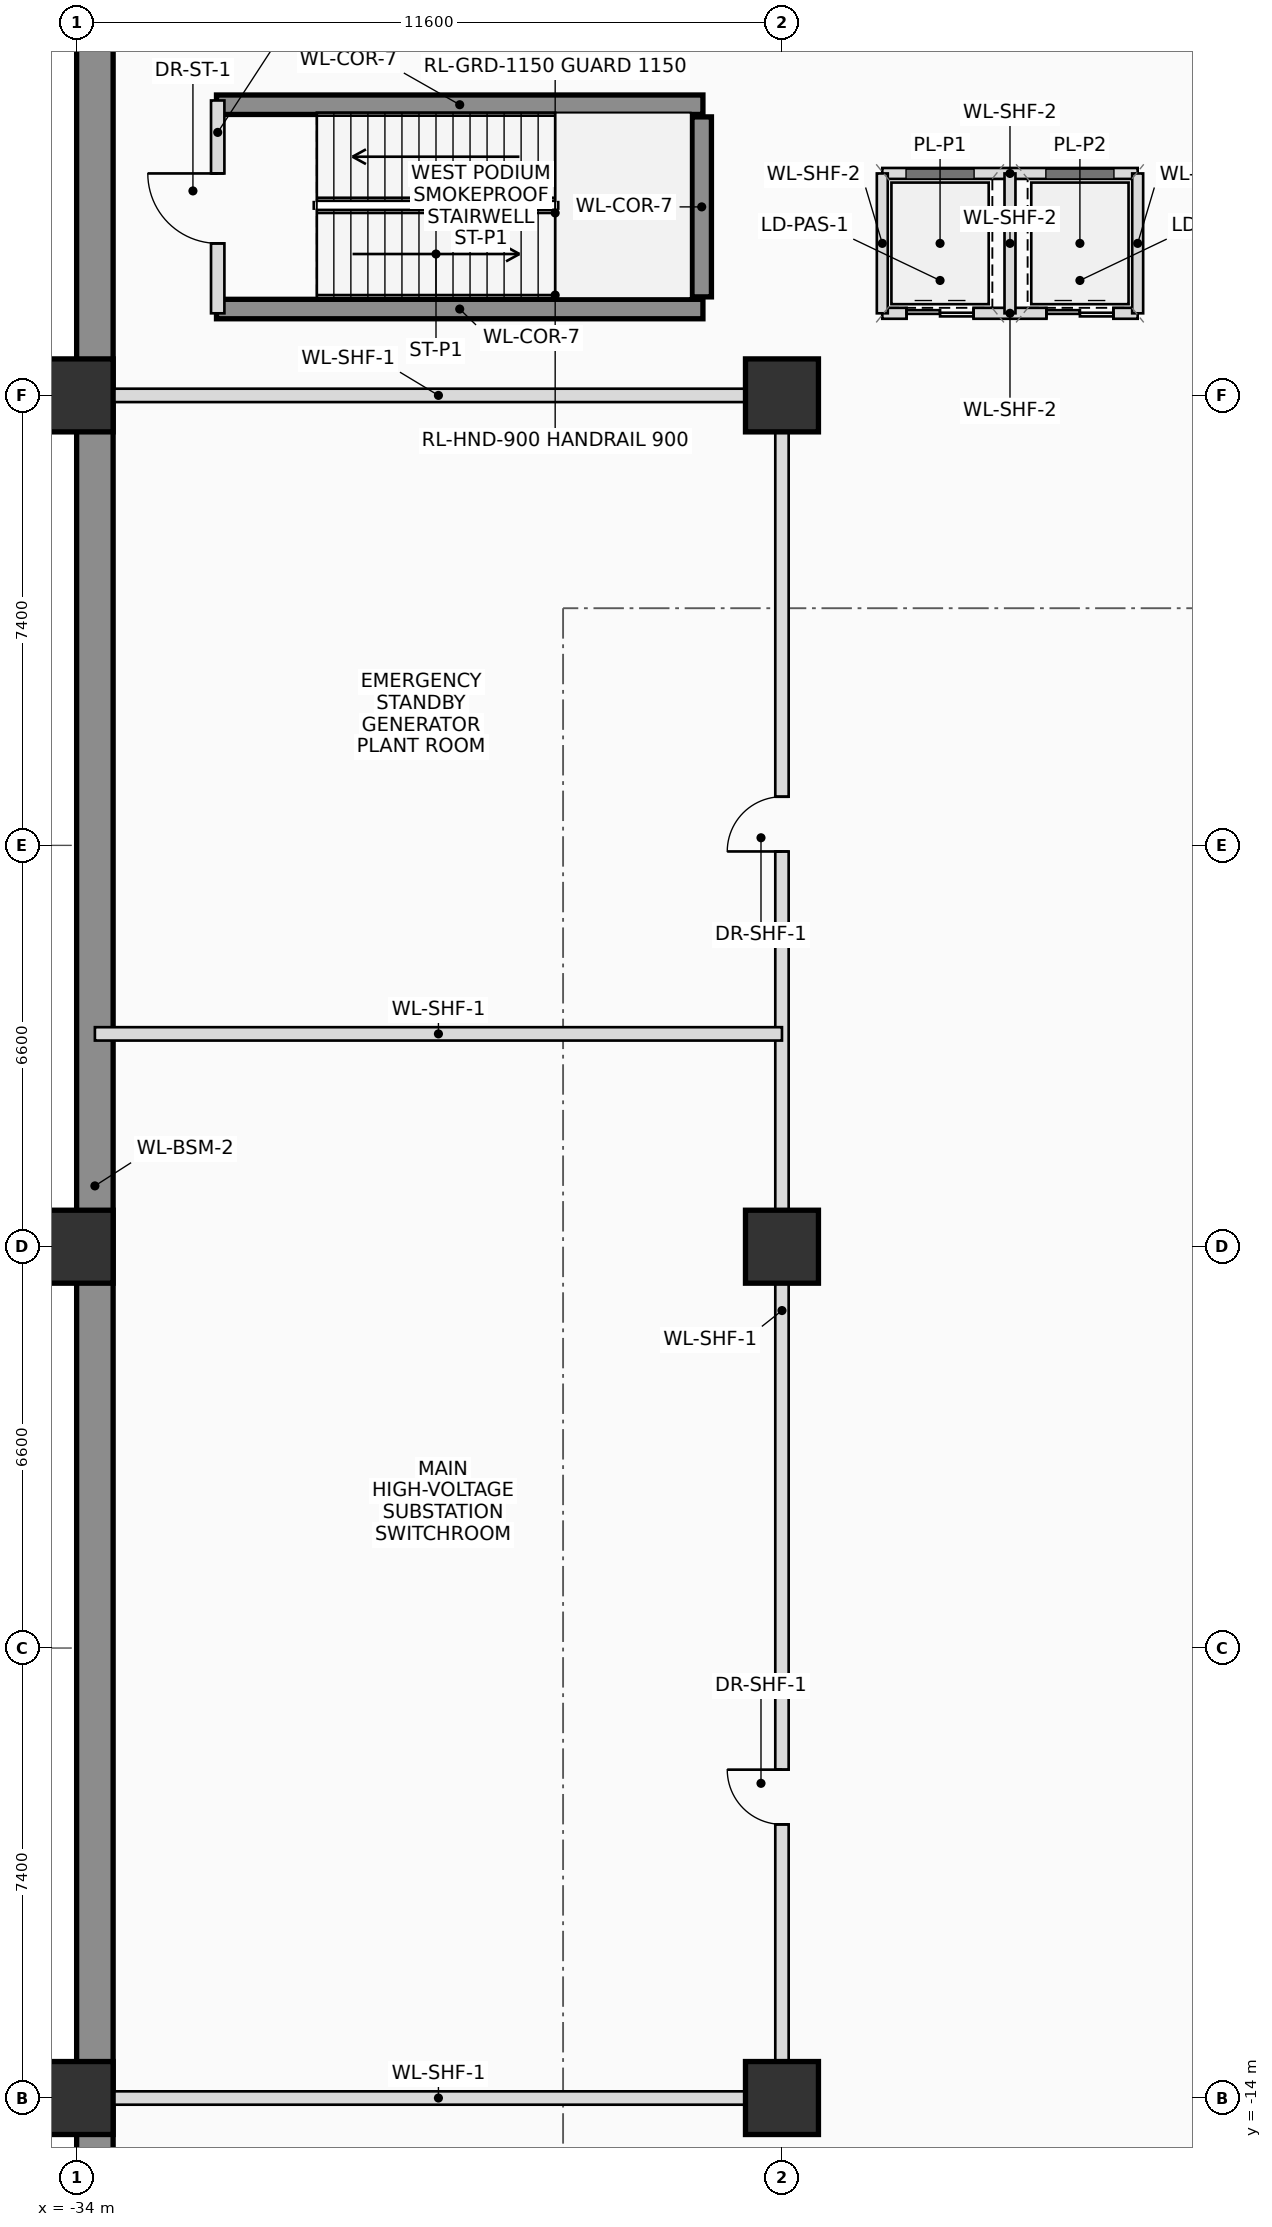
"""IFC4 building model, lengths in metres.
Left out: names, types, materials, properties, quantities, classifications, styles, units other than length and angle.
Written with IfcOpenShell. Run it as: python <this file> out.ifc"""

import sys

from ifc_helpers import new_model, si_unit, direction, frame, frame_2d, origin, origin_2d, place, context, subcontext, project, spatial, rectangle, extrude, source, transform, mapped, element, fill, save


model = new_model("IFC4")
c1 = context("Model", 3, precision=1e-05, world=origin(), true_north=direction((0.0, 1.0)))
c2 = subcontext(c1, "Body", "Model", "MODEL_VIEW")
j1 = project(units=[si_unit("LENGTHUNIT", "METRE"), si_unit("PLANEANGLEUNIT", "RADIAN")], contexts=[c1])
p1 = place(None, origin())
s1 = spatial("IfcSite", under=j1, at=p1, CompositionType="ELEMENT")
p2 = place(p1, origin())
s2 = spatial("IfcBuilding", under=s1, at=p2, CompositionType="ELEMENT")
p3 = place(p2, frame((0.0, 0.0, -4.8)))
s3 = spatial("IfcBuildingStorey", under=s2, at=p3, CompositionType="ELEMENT", Elevation=-4.8)
for number, where, z_axis, x_axis in (
    (1, (-31.7, 18.78, 0.0), (0.0, 0.0, 1.0), (1.0, 0.0, 0.0)),
    (2, (-31.7, 15.42, 0.0), (0.0, 0.0, 1.0), (1.0, 0.0, 0.0)),
):
    element("IfcWall", number, at=place(p3, frame(where, z_axis=z_axis, x_axis=x_axis)), inside=s3, PredefinedType="SHEAR", context=c2, shape_type="SweptSolid", body=[
        extrude(rectangle(XDim=8.0, YDim=0.32, at=frame_2d((4.0, 0.0))), origin(), (0.0, 0.0, 1.0), 4.8),
    ])
p4 = place(p3, frame((-23.72, 15.62, 0.0), z_axis=(0.0, 0.0, 1.0), x_axis=(0.0, 1.0, 0.0)))
e3 = element("IfcWall", 3, at=p4, inside=s3, PredefinedType="SHEAR", context=c2, shape_type="SweptSolid", body=[
    extrude(rectangle(XDim=2.96, YDim=0.32, at=frame_2d((1.48, 0.0))), origin(), (0.0, 0.0, 1.0), 4.8),
])
p5 = place(p3, frame((-33.7, -26.9, 0.0), z_axis=(0.0, 0.0, 1.0), x_axis=(0.0, 1.0, 0.0)))
e4 = element("IfcWall", 4, at=p5, inside=s3, PredefinedType="USERDEFINED", context=c2, shape_type="SweptSolid", body=[
    extrude(rectangle(XDim=55.8, YDim=0.6, at=frame_2d((27.9, 0.0))), origin(), (0.0, 0.0, 1.0), 4.56),
])
m1 = source(origin(), c2, "Body", "SweptSolid", [
    extrude(rectangle(XDim=1.2, YDim=1.2, at=origin_2d()), origin(), (0.0, 0.0, 1.0), 4.8),
])
for number, where, z_axis, x_axis in (
    (5, (-34.0, -14.0, 0.0), (0.0, 0.0, 1.0), (1.0, 0.0, 0.0)),
    (6, (-22.4, -14.0, 0.0), (0.0, 0.0, 1.0), (1.0, 0.0, 0.0)),
    (7, (-34.0, 0.0, 0.0), (0.0, 0.0, 1.0), (1.0, 0.0, 0.0)),
    (8, (-22.4, 0.0, 0.0), (0.0, 0.0, 1.0), (1.0, 0.0, 0.0)),
    (9, (-34.0, 14.0, 0.0), (0.0, 0.0, 1.0), (1.0, 0.0, 0.0)),
    (10, (-22.4, 14.0, 0.0), (0.0, 0.0, 1.0), (1.0, 0.0, 0.0)),
):
    element("IfcColumn", number, at=place(p3, frame(where, z_axis=z_axis, x_axis=x_axis)), inside=s3, PredefinedType="COLUMN", context=c2, shape_type="MappedRepresentation", body=[
        mapped(m1, transform((0.0, 0.0, 0.0), scale=1.0)),
    ])
p6 = place(p3, frame((-31.68, 15.35, 0.0), z_axis=(0.0, 0.0, 1.0), x_axis=(0.0, 1.0, 0.0)))
e11 = element("IfcWall", 11, at=p6, inside=s3, PredefinedType="PLUMBINGWALL", context=c2, shape_type="SweptSolid", body=[
    extrude(rectangle(XDim=3.5, YDim=0.22, at=frame_2d((1.75, 0.0))), origin(), (0.0, 0.0, 1.0), 4.27),
])
p7 = place(p6, frame((1.15, 0.0, 0.0)))
e12 = element("IfcOpeningElement", 12, at=p7, cuts=e11, PredefinedType="OPENING", context=c2, shape_type="SweptSolid", body=[
    extrude(rectangle(XDim=1.15, YDim=2.15, at=frame_2d((0.575, 1.075))), frame((0.0, 0.12, 0.0), z_axis=(0.0, -1.0, 0.0), x_axis=(1.0, 0.0, 0.0)), (0.0, 0.0, 1.0), 0.24),
])
p8 = place(p3, frame((-20.75, 15.35, 0.0), z_axis=(0.0, 0.0, 1.0), x_axis=(1.0, 0.0, 0.0)))
e13 = element("IfcWall", 13, at=p8, inside=s3, PredefinedType="PLUMBINGWALL", context=c2, shape_type="SweptSolid", body=[
    extrude(rectangle(XDim=4.2, YDim=0.18, at=frame_2d((2.1, 0.0))), origin(), (0.0, 0.0, 1.0), 4.54),
])
p9 = place(p8, frame((0.4, 0.0, 0.0)))
e14 = element("IfcOpeningElement", 14, at=p9, cuts=e13, PredefinedType="OPENING", context=c2, shape_type="SweptSolid", body=[
    extrude(rectangle(XDim=1.1, YDim=2.2, at=frame_2d((0.55, 1.1))), frame((0.0, 0.1, 0.0), z_axis=(0.0, -1.0, 0.0), x_axis=(1.0, 0.0, 0.0)), (0.0, 0.0, 1.0), 0.2),
])
p10 = place(p8, frame((2.7, 0.0, 0.0)))
e15 = element("IfcOpeningElement", 15, at=p10, cuts=e13, PredefinedType="OPENING", context=c2, shape_type="SweptSolid", body=[
    extrude(rectangle(XDim=1.1, YDim=2.2, at=frame_2d((0.55, 1.1))), frame((0.0, 0.1, 0.0), z_axis=(0.0, -1.0, 0.0), x_axis=(1.0, 0.0, 0.0)), (0.0, 0.0, 1.0), 0.2),
])
p11 = place(p3, frame((-20.75, 17.65, 0.0), z_axis=(0.0, 0.0, 1.0), x_axis=(1.0, 0.0, 0.0)))
e16 = element("IfcWall", 16, at=p11, inside=s3, PredefinedType="PLUMBINGWALL", context=c2, shape_type="SweptSolid", body=[
    extrude(rectangle(XDim=4.2, YDim=0.18, at=frame_2d((2.1, 0.0))), origin(), (0.0, 0.0, 1.0), 4.54),
])
for number, where, z_axis, x_axis in (
    (17, (-20.75, 15.35, 0.0), (0.0, 0.0, 1.0), (0.0, 1.0, 0.0)),
    (18, (-18.65, 15.35, 0.0), (0.0, 0.0, 1.0), (0.0, 1.0, 0.0)),
    (19, (-16.55, 15.35, 0.0), (0.0, 0.0, 1.0), (0.0, 1.0, 0.0)),
):
    element("IfcWall", number, at=place(p3, frame(where, z_axis=z_axis, x_axis=x_axis)), inside=s3, PredefinedType="PLUMBINGWALL", context=c2, shape_type="SweptSolid", body=[
        extrude(rectangle(XDim=2.3, YDim=0.18, at=frame_2d((1.15, 0.0))), origin(), (0.0, 0.0, 1.0), 4.54),
    ])
p12 = place(p3, frame((-22.4, -14.0, 0.0), z_axis=(0.0, 0.0, 1.0), x_axis=(0.0, 1.0, 0.0)))
e20 = element("IfcWall", 20, at=p12, inside=s3, PredefinedType="PLUMBINGWALL", context=c2, shape_type="SweptSolid", body=[
    extrude(rectangle(XDim=28.0, YDim=0.22, at=frame_2d((14.0, 0.0))), origin(), (0.0, 0.0, 1.0), 3.745),
])
p13 = place(p12, frame((4.5, 0.0, 0.0)))
e21 = element("IfcOpeningElement", 21, at=p13, cuts=e20, PredefinedType="OPENING", context=c2, shape_type="SweptSolid", body=[
    extrude(rectangle(XDim=0.9, YDim=2.05, at=frame_2d((0.45, 1.025))), frame((0.0, 0.12, 0.0), z_axis=(0.0, -1.0, 0.0), x_axis=(1.0, 0.0, 0.0)), (0.0, 0.0, 1.0), 0.24),
])
p14 = place(p12, frame((20.5, 0.0, 0.0)))
e22 = element("IfcOpeningElement", 22, at=p14, cuts=e20, PredefinedType="OPENING", context=c2, shape_type="SweptSolid", body=[
    extrude(rectangle(XDim=0.9, YDim=2.05, at=frame_2d((0.45, 1.025))), frame((0.0, 0.12, 0.0), z_axis=(0.0, -1.0, 0.0), x_axis=(1.0, 0.0, 0.0)), (0.0, 0.0, 1.0), 0.24),
])
for number, where, z_axis, x_axis in (
    (23, (-33.7, 14.0, 0.0), (0.0, 0.0, 1.0), (1.0, 0.0, 0.0)),
    (24, (-33.7, -14.0, 0.0), (0.0, 0.0, 1.0), (1.0, 0.0, 0.0)),
    (25, (-33.7, 3.5, 0.0), (0.0, 0.0, 1.0), (1.0, 0.0, 0.0)),
):
    element("IfcWall", number, at=place(p3, frame(where, z_axis=z_axis, x_axis=x_axis)), inside=s3, PredefinedType="PLUMBINGWALL", context=c2, shape_type="SweptSolid", body=[
        extrude(rectangle(XDim=11.3, YDim=0.22, at=frame_2d((5.65, 0.0))), origin(), (0.0, 0.0, 1.0), 3.745),
    ])
p15 = place(p7, origin())
e26 = element("IfcDoor", 26, at=p15, inside=s3, OperationType="SINGLE_SWING_RIGHT", PredefinedType="DOOR", context=c2, shape_type="SweptSolid", body=[
    extrude(rectangle(XDim=1.15, YDim=2.15, at=frame_2d((0.575, 1.075))), frame((0.0, 0.025, 0.0), z_axis=(0.0, -1.0, 0.0), x_axis=(1.0, 0.0, 0.0)), (0.0, 0.0, 1.0), 0.05),
])
fill(e12, e26)
p16 = place(p9, origin())
e27 = element("IfcDoor", 27, at=p16, inside=s3, OperationType="DOUBLE_DOOR_SLIDING", PredefinedType="DOOR", context=c2, shape_type="SweptSolid", body=[
    extrude(rectangle(XDim=1.1, YDim=2.2, at=frame_2d((0.55, 1.1))), frame((0.0, 0.025, 0.0), z_axis=(0.0, -1.0, 0.0), x_axis=(1.0, 0.0, 0.0)), (0.0, 0.0, 1.0), 0.05),
])
fill(e14, e27)
p17 = place(p10, origin())
e28 = element("IfcDoor", 28, at=p17, inside=s3, OperationType="DOUBLE_DOOR_SLIDING", PredefinedType="DOOR", context=c2, shape_type="SweptSolid", body=[
    extrude(rectangle(XDim=1.1, YDim=2.2, at=frame_2d((0.55, 1.1))), frame((0.0, 0.025, 0.0), z_axis=(0.0, -1.0, 0.0), x_axis=(1.0, 0.0, 0.0)), (0.0, 0.0, 1.0), 0.05),
])
fill(e15, e28)
p18 = place(p13, origin())
e29 = element("IfcDoor", 29, at=p18, inside=s3, OperationType="SINGLE_SWING_RIGHT", PredefinedType="DOOR", context=c2, shape_type="SweptSolid", body=[
    extrude(rectangle(XDim=0.9, YDim=2.05, at=frame_2d((0.45, 1.025))), frame((0.0, 0.025, 0.0), z_axis=(0.0, -1.0, 0.0), x_axis=(1.0, 0.0, 0.0)), (0.0, 0.0, 1.0), 0.05),
])
fill(e21, e29)
p19 = place(p14, origin())
e30 = element("IfcDoor", 30, at=p19, inside=s3, OperationType="SINGLE_SWING_LEFT", PredefinedType="DOOR", context=c2, shape_type="SweptSolid", body=[
    extrude(rectangle(XDim=0.9, YDim=2.05, at=frame_2d((0.45, 1.025))), frame((0.0, 0.025, 0.0), z_axis=(0.0, -1.0, 0.0), x_axis=(1.0, 0.0, 0.0)), (0.0, 0.0, 1.0), 0.05),
])
fill(e22, e30)
save(model, sys.argv[1])
